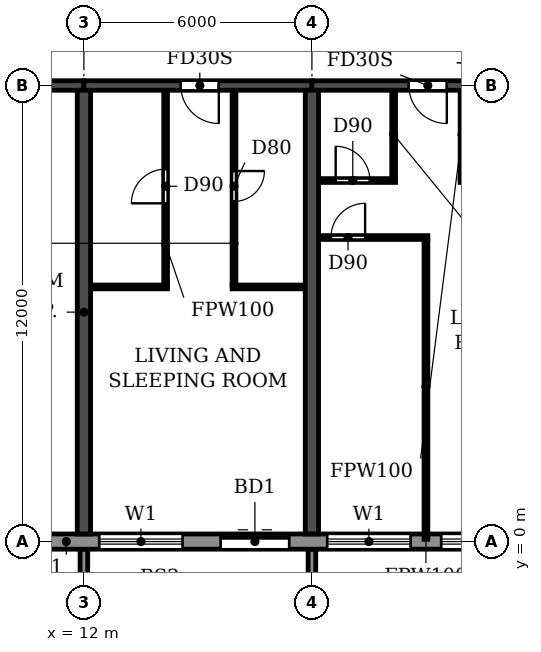
"""IFC4 building model, lengths in metres.
Left out: names, types, materials, properties, quantities, classifications, styles, units other than length and angle.
Written with IfcOpenShell. Run it as: python <this file> out.ifc"""

import sys

from ifc_helpers import new_model, si_unit, direction, frame, frame_2d, origin, place, context, subcontext, project, spatial, polyline, rectangle, outline, extrude, source, transform, mapped, element, fill, save


model = new_model("IFC4")
c1 = context("Model", 3, precision=1e-05, world=origin(), true_north=direction((0.0, 1.0)))
c2 = subcontext(c1, "Body", "Model", "MODEL_VIEW")
j1 = project(units=[si_unit("LENGTHUNIT", "METRE"), si_unit("PLANEANGLEUNIT", "RADIAN")], contexts=[c1])
p1 = place(None, origin())
s1 = spatial("IfcSite", under=j1, at=p1, CompositionType="ELEMENT")
p2 = place(p1, origin())
s2 = spatial("IfcBuilding", under=s1, at=p2, CompositionType="ELEMENT")
p3 = place(p2, frame((0.0, 0.0, 82.8)))
s3 = spatial("IfcBuildingStorey", under=s2, at=p3, CompositionType="ELEMENT", Elevation=82.8)
for number, where, z_axis, x_axis in (
    (1, (12.0, 0.2, 0.0), (0.0, 0.0, 1.0), (0.0, 1.0, 0.0)),
    (2, (18.0, 0.2, 0.0), (0.0, 0.0, 1.0), (0.0, 1.0, 0.0)),
):
    element("IfcWall", number, at=place(p3, frame(where, z_axis=z_axis, x_axis=x_axis)), inside=s3, PredefinedType="SHEAR", context=c2, shape_type="SweptSolid", body=[
        extrude(rectangle(XDim=11.675, YDim=0.35, at=frame_2d((5.837, 0.0))), origin(), (0.0, 0.0, 1.0), 3.06),
    ])
p4 = place(p3, frame((6.2, 12.0, 0.0), z_axis=(0.0, 0.0, 1.0), x_axis=(1.0, 0.0, 0.0)))
e3 = element("IfcWall", 3, at=p4, inside=s3, PredefinedType="SHEAR", context=c2, shape_type="SweptSolid", body=[
    extrude(rectangle(XDim=5.8, YDim=0.25, at=frame_2d((2.9, 0.0))), origin(), (0.0, 0.0, 1.0), 2.46),
])
p5 = place(p4, frame((2.3, 0.0, 0.0)))
e4 = element("IfcOpeningElement", 4, at=p5, cuts=e3, PredefinedType="OPENING", context=c2, shape_type="SweptSolid", body=[
    extrude(rectangle(XDim=1.0, YDim=2.1, at=frame_2d((0.5, 1.05))), frame((0.0, 0.135, 0.0), z_axis=(0.0, -1.0, 0.0), x_axis=(1.0, 0.0, 0.0)), (0.0, 0.0, 1.0), 0.27),
])
p6 = place(p3, frame((12.0, 12.0, 0.0), z_axis=(0.0, 0.0, 1.0), x_axis=(1.0, 0.0, 0.0)))
e5 = element("IfcWall", 5, at=p6, inside=s3, PredefinedType="SHEAR", context=c2, shape_type="SweptSolid", body=[
    extrude(rectangle(XDim=6.0, YDim=0.25, at=frame_2d((3.0, 0.0))), origin(), (0.0, 0.0, 1.0), 2.46),
])
p7 = place(p6, frame((2.55, 0.0, 0.0)))
e6 = element("IfcOpeningElement", 6, at=p7, cuts=e5, PredefinedType="OPENING", context=c2, shape_type="SweptSolid", body=[
    extrude(rectangle(XDim=1.0, YDim=2.1, at=frame_2d((0.5, 1.05))), frame((0.0, 0.135, 0.0), z_axis=(0.0, -1.0, 0.0), x_axis=(1.0, 0.0, 0.0)), (0.0, 0.0, 1.0), 0.27),
])
p8 = place(p3, frame((18.0, 12.0, 0.0), z_axis=(0.0, 0.0, 1.0), x_axis=(1.0, 0.0, 0.0)))
e7 = element("IfcWall", 7, at=p8, inside=s3, PredefinedType="SHEAR", context=c2, shape_type="SweptSolid", body=[
    extrude(rectangle(XDim=6.0, YDim=0.25, at=frame_2d((3.0, 0.0))), origin(), (0.0, 0.0, 1.0), 2.46),
])
p9 = place(p8, frame((2.55, 0.0, 0.0)))
e8 = element("IfcOpeningElement", 8, at=p9, cuts=e7, PredefinedType="OPENING", context=c2, shape_type="SweptSolid", body=[
    extrude(rectangle(XDim=1.0, YDim=2.1, at=frame_2d((0.5, 1.05))), frame((0.0, 0.135, 0.0), z_axis=(0.0, -1.0, 0.0), x_axis=(1.0, 0.0, 0.0)), (0.0, 0.0, 1.0), 0.27),
])
p10 = place(p3, frame((10.683, 0.0, 0.0), z_axis=(0.0, 0.0, 1.0), x_axis=(1.0, 0.0, 0.0)))
e9 = element("IfcWall", 9, at=p10, inside=s3, PredefinedType="STANDARD", context=c2, shape_type="SweptSolid", body=[
    extrude(rectangle(XDim=80.634, YDim=0.4, at=frame_2d((40.317, 0.0))), origin(), (0.0, 0.0, 1.0), 3.06),
])
p11 = place(p10, frame((1.717, 0.0, 0.9)))
e10 = element("IfcOpeningElement", 10, at=p11, cuts=e9, PredefinedType="OPENING", context=c2, shape_type="SweptSolid", body=[
    extrude(rectangle(XDim=2.2, YDim=1.5, at=frame_2d((1.1, 0.75))), frame((0.0, 0.21, 0.0), z_axis=(0.0, -1.0, 0.0), x_axis=(1.0, 0.0, 0.0)), (0.0, 0.0, 1.0), 0.42),
])
p12 = place(p10, frame((4.917, 0.0, 0.0)))
e11 = element("IfcOpeningElement", 11, at=p12, cuts=e9, PredefinedType="OPENING", context=c2, shape_type="SweptSolid", body=[
    extrude(rectangle(XDim=1.8, YDim=2.4, at=frame_2d((0.9, 1.2))), frame((0.0, 0.21, 0.0), z_axis=(0.0, -1.0, 0.0), x_axis=(1.0, 0.0, 0.0)), (0.0, 0.0, 1.0), 0.42),
])
p13 = place(p10, frame((7.717, 0.0, 0.9)))
e12 = element("IfcOpeningElement", 12, at=p13, cuts=e9, PredefinedType="OPENING", context=c2, shape_type="SweptSolid", body=[
    extrude(rectangle(XDim=2.2, YDim=1.5, at=frame_2d((1.1, 0.75))), frame((0.0, 0.21, 0.0), z_axis=(0.0, -1.0, 0.0), x_axis=(1.0, 0.0, 0.0)), (0.0, 0.0, 1.0), 0.42),
])
p14 = place(p10, frame((10.717, 0.0, 0.9)))
e13 = element("IfcOpeningElement", 13, at=p14, cuts=e9, PredefinedType="OPENING", context=c2, shape_type="SweptSolid", body=[
    extrude(rectangle(XDim=2.2, YDim=1.5, at=frame_2d((1.1, 0.75))), frame((0.0, 0.21, 0.0), z_axis=(0.0, -1.0, 0.0), x_axis=(1.0, 0.0, 0.0)), (0.0, 0.0, 1.0), 0.42),
])
p15 = place(p10, frame((13.917, 0.0, 0.0)))
e14 = element("IfcOpeningElement", 14, at=p15, cuts=e9, PredefinedType="OPENING", context=c2, shape_type="SweptSolid", body=[
    extrude(rectangle(XDim=1.8, YDim=2.4, at=frame_2d((0.9, 1.2))), frame((0.0, 0.21, 0.0), z_axis=(0.0, -1.0, 0.0), x_axis=(1.0, 0.0, 0.0)), (0.0, 0.0, 1.0), 0.42),
])
p16 = place(p10, frame((16.717, 0.0, 0.9)))
e15 = element("IfcOpeningElement", 15, at=p16, cuts=e9, PredefinedType="OPENING", context=c2, shape_type="SweptSolid", body=[
    extrude(rectangle(XDim=2.2, YDim=1.5, at=frame_2d((1.1, 0.75))), frame((0.0, 0.21, 0.0), z_axis=(0.0, -1.0, 0.0), x_axis=(1.0, 0.0, 0.0)), (0.0, 0.0, 1.0), 0.42),
])
p17 = place(p10, frame((19.717, 0.0, 0.9)))
e16 = element("IfcOpeningElement", 16, at=p17, cuts=e9, PredefinedType="OPENING", context=c2, shape_type="SweptSolid", body=[
    extrude(rectangle(XDim=2.2, YDim=1.5, at=frame_2d((1.1, 0.75))), frame((0.0, 0.21, 0.0), z_axis=(0.0, -1.0, 0.0), x_axis=(1.0, 0.0, 0.0)), (0.0, 0.0, 1.0), 0.42),
])
p18 = place(p10, frame((22.717, 0.0, 0.9)))
e17 = element("IfcOpeningElement", 17, at=p18, cuts=e9, PredefinedType="OPENING", context=c2, shape_type="SweptSolid", body=[
    extrude(rectangle(XDim=2.2, YDim=1.5, at=frame_2d((1.1, 0.75))), frame((0.0, 0.21, 0.0), z_axis=(0.0, -1.0, 0.0), x_axis=(1.0, 0.0, 0.0)), (0.0, 0.0, 1.0), 0.42),
])
p19 = place(p10, frame((25.917, 0.0, 0.0)))
e18 = element("IfcOpeningElement", 18, at=p19, cuts=e9, PredefinedType="OPENING", context=c2, shape_type="SweptSolid", body=[
    extrude(rectangle(XDim=1.8, YDim=2.4, at=frame_2d((0.9, 1.2))), frame((0.0, 0.21, 0.0), z_axis=(0.0, -1.0, 0.0), x_axis=(1.0, 0.0, 0.0)), (0.0, 0.0, 1.0), 0.42),
])
p20 = place(p10, frame((28.717, 0.0, 0.9)))
e19 = element("IfcOpeningElement", 19, at=p20, cuts=e9, PredefinedType="OPENING", context=c2, shape_type="SweptSolid", body=[
    extrude(rectangle(XDim=2.2, YDim=1.5, at=frame_2d((1.1, 0.75))), frame((0.0, 0.21, 0.0), z_axis=(0.0, -1.0, 0.0), x_axis=(1.0, 0.0, 0.0)), (0.0, 0.0, 1.0), 0.42),
])
p21 = place(p10, frame((31.717, 0.0, 0.9)))
e20 = element("IfcOpeningElement", 20, at=p21, cuts=e9, PredefinedType="OPENING", context=c2, shape_type="SweptSolid", body=[
    extrude(rectangle(XDim=2.2, YDim=1.5, at=frame_2d((1.1, 0.75))), frame((0.0, 0.21, 0.0), z_axis=(0.0, -1.0, 0.0), x_axis=(1.0, 0.0, 0.0)), (0.0, 0.0, 1.0), 0.42),
])
p22 = place(p10, frame((34.717, 0.0, 0.9)))
e21 = element("IfcOpeningElement", 21, at=p22, cuts=e9, PredefinedType="OPENING", context=c2, shape_type="SweptSolid", body=[
    extrude(rectangle(XDim=2.2, YDim=1.5, at=frame_2d((1.1, 0.75))), frame((0.0, 0.21, 0.0), z_axis=(0.0, -1.0, 0.0), x_axis=(1.0, 0.0, 0.0)), (0.0, 0.0, 1.0), 0.42),
])
p23 = place(p10, frame((37.717, 0.0, 0.9)))
e22 = element("IfcOpeningElement", 22, at=p23, cuts=e9, PredefinedType="OPENING", context=c2, shape_type="SweptSolid", body=[
    extrude(rectangle(XDim=2.2, YDim=1.5, at=frame_2d((1.1, 0.75))), frame((0.0, 0.21, 0.0), z_axis=(0.0, -1.0, 0.0), x_axis=(1.0, 0.0, 0.0)), (0.0, 0.0, 1.0), 0.42),
])
p24 = place(p10, frame((40.917, 0.0, 0.0)))
e23 = element("IfcOpeningElement", 23, at=p24, cuts=e9, PredefinedType="OPENING", context=c2, shape_type="SweptSolid", body=[
    extrude(rectangle(XDim=1.8, YDim=2.4, at=frame_2d((0.9, 1.2))), frame((0.0, 0.21, 0.0), z_axis=(0.0, -1.0, 0.0), x_axis=(1.0, 0.0, 0.0)), (0.0, 0.0, 1.0), 0.42),
])
p25 = place(p10, frame((43.717, 0.0, 0.9)))
e24 = element("IfcOpeningElement", 24, at=p25, cuts=e9, PredefinedType="OPENING", context=c2, shape_type="SweptSolid", body=[
    extrude(rectangle(XDim=2.2, YDim=1.5, at=frame_2d((1.1, 0.75))), frame((0.0, 0.21, 0.0), z_axis=(0.0, -1.0, 0.0), x_axis=(1.0, 0.0, 0.0)), (0.0, 0.0, 1.0), 0.42),
])
p26 = place(p10, frame((46.717, 0.0, 0.9)))
e25 = element("IfcOpeningElement", 25, at=p26, cuts=e9, PredefinedType="OPENING", context=c2, shape_type="SweptSolid", body=[
    extrude(rectangle(XDim=2.2, YDim=1.5, at=frame_2d((1.1, 0.75))), frame((0.0, 0.21, 0.0), z_axis=(0.0, -1.0, 0.0), x_axis=(1.0, 0.0, 0.0)), (0.0, 0.0, 1.0), 0.42),
])
p27 = place(p10, frame((49.717, 0.0, 0.9)))
e26 = element("IfcOpeningElement", 26, at=p27, cuts=e9, PredefinedType="OPENING", context=c2, shape_type="SweptSolid", body=[
    extrude(rectangle(XDim=2.2, YDim=1.5, at=frame_2d((1.1, 0.75))), frame((0.0, 0.21, 0.0), z_axis=(0.0, -1.0, 0.0), x_axis=(1.0, 0.0, 0.0)), (0.0, 0.0, 1.0), 0.42),
])
p28 = place(p10, frame((52.917, 0.0, 0.0)))
e27 = element("IfcOpeningElement", 27, at=p28, cuts=e9, PredefinedType="OPENING", context=c2, shape_type="SweptSolid", body=[
    extrude(rectangle(XDim=1.8, YDim=2.4, at=frame_2d((0.9, 1.2))), frame((0.0, 0.21, 0.0), z_axis=(0.0, -1.0, 0.0), x_axis=(1.0, 0.0, 0.0)), (0.0, 0.0, 1.0), 0.42),
])
p29 = place(p10, frame((55.717, 0.0, 0.9)))
e28 = element("IfcOpeningElement", 28, at=p29, cuts=e9, PredefinedType="OPENING", context=c2, shape_type="SweptSolid", body=[
    extrude(rectangle(XDim=2.2, YDim=1.5, at=frame_2d((1.1, 0.75))), frame((0.0, 0.21, 0.0), z_axis=(0.0, -1.0, 0.0), x_axis=(1.0, 0.0, 0.0)), (0.0, 0.0, 1.0), 0.42),
])
p30 = place(p10, frame((58.717, 0.0, 0.9)))
e29 = element("IfcOpeningElement", 29, at=p30, cuts=e9, PredefinedType="OPENING", context=c2, shape_type="SweptSolid", body=[
    extrude(rectangle(XDim=2.2, YDim=1.5, at=frame_2d((1.1, 0.75))), frame((0.0, 0.21, 0.0), z_axis=(0.0, -1.0, 0.0), x_axis=(1.0, 0.0, 0.0)), (0.0, 0.0, 1.0), 0.42),
])
p31 = place(p10, frame((61.717, 0.0, 0.9)))
e30 = element("IfcOpeningElement", 30, at=p31, cuts=e9, PredefinedType="OPENING", context=c2, shape_type="SweptSolid", body=[
    extrude(rectangle(XDim=2.2, YDim=1.5, at=frame_2d((1.1, 0.75))), frame((0.0, 0.21, 0.0), z_axis=(0.0, -1.0, 0.0), x_axis=(1.0, 0.0, 0.0)), (0.0, 0.0, 1.0), 0.42),
])
p32 = place(p10, frame((64.917, 0.0, 0.0)))
e31 = element("IfcOpeningElement", 31, at=p32, cuts=e9, PredefinedType="OPENING", context=c2, shape_type="SweptSolid", body=[
    extrude(rectangle(XDim=1.8, YDim=2.4, at=frame_2d((0.9, 1.2))), frame((0.0, 0.21, 0.0), z_axis=(0.0, -1.0, 0.0), x_axis=(1.0, 0.0, 0.0)), (0.0, 0.0, 1.0), 0.42),
])
p33 = place(p10, frame((67.717, 0.0, 0.9)))
e32 = element("IfcOpeningElement", 32, at=p33, cuts=e9, PredefinedType="OPENING", context=c2, shape_type="SweptSolid", body=[
    extrude(rectangle(XDim=2.2, YDim=1.5, at=frame_2d((1.1, 0.75))), frame((0.0, 0.21, 0.0), z_axis=(0.0, -1.0, 0.0), x_axis=(1.0, 0.0, 0.0)), (0.0, 0.0, 1.0), 0.42),
])
p34 = place(p10, frame((70.717, 0.0, 0.9)))
e33 = element("IfcOpeningElement", 33, at=p34, cuts=e9, PredefinedType="OPENING", context=c2, shape_type="SweptSolid", body=[
    extrude(rectangle(XDim=2.2, YDim=1.5, at=frame_2d((1.1, 0.75))), frame((0.0, 0.21, 0.0), z_axis=(0.0, -1.0, 0.0), x_axis=(1.0, 0.0, 0.0)), (0.0, 0.0, 1.0), 0.42),
])
p35 = place(p10, frame((73.917, 0.0, 0.0)))
e34 = element("IfcOpeningElement", 34, at=p35, cuts=e9, PredefinedType="OPENING", context=c2, shape_type="SweptSolid", body=[
    extrude(rectangle(XDim=1.8, YDim=2.4, at=frame_2d((0.9, 1.2))), frame((0.0, 0.21, 0.0), z_axis=(0.0, -1.0, 0.0), x_axis=(1.0, 0.0, 0.0)), (0.0, 0.0, 1.0), 0.42),
])
p36 = place(p10, frame((76.717, 0.0, 0.9)))
e35 = element("IfcOpeningElement", 35, at=p36, cuts=e9, PredefinedType="OPENING", context=c2, shape_type="SweptSolid", body=[
    extrude(rectangle(XDim=2.2, YDim=1.5, at=frame_2d((1.1, 0.75))), frame((0.0, 0.21, 0.0), z_axis=(0.0, -1.0, 0.0), x_axis=(1.0, 0.0, 0.0)), (0.0, 0.0, 1.0), 0.42),
])
m1 = source(origin(), c2, "Body", "SweptSolid", [
    extrude(outline(polyline([(0.0, 0.0), (0.2, 0.0), (0.2, 1.65), (0.0, 1.65), (0.0, 0.0)])), origin(), (0.0, 0.0, 1.0), 3.1),
])
for number, where in (
    (36, (11.9, -1.85, 0.0)),
    (37, (17.9, -1.85, 0.0)),
):
    element("IfcWall", number, at=place(p3, frame(where)), inside=s3, PredefinedType="STANDARD", context=c2, shape_type="MappedRepresentation", body=[
        mapped(m1, transform((0.0, 0.0, 0.0))),
    ])
p37 = place(p3, frame((12.185, 6.7, 0.0), z_axis=(0.0, 0.0, 1.0), x_axis=(1.0, 0.0, 0.0)))
e38 = element("IfcWall", 38, at=p37, inside=s3, PredefinedType="PARTITIONING", context=c2, shape_type="SweptSolid", body=[
    extrude(rectangle(XDim=2.015, YDim=0.1, at=frame_2d((1.007, 0.0))), origin(), (0.0, 0.0, 1.0), 3.06),
])
p38 = place(p3, frame((15.9, 6.7, 0.0), z_axis=(0.0, 0.0, 1.0), x_axis=(1.0, 0.0, 0.0)))
e39 = element("IfcWall", 39, at=p38, inside=s3, PredefinedType="PARTITIONING", context=c2, shape_type="SweptSolid", body=[
    extrude(rectangle(XDim=1.915, YDim=0.1, at=frame_2d((0.958, 0.0))), origin(), (0.0, 0.0, 1.0), 3.06),
])
p39 = place(p3, frame((18.185, 8.0, 0.0), z_axis=(0.0, 0.0, 1.0), x_axis=(1.0, 0.0, 0.0)))
e40 = element("IfcWall", 40, at=p39, inside=s3, PredefinedType="PARTITIONING", context=c2, shape_type="SweptSolid", body=[
    extrude(rectangle(XDim=2.865, YDim=0.1, at=frame_2d((1.433, 0.0))), origin(), (0.0, 0.0, 1.0), 3.06),
])
p40 = place(p39, frame((0.315, 0.0, 0.0)))
e41 = element("IfcOpeningElement", 41, at=p40, cuts=e40, PredefinedType="OPENING", context=c2, shape_type="SweptSolid", body=[
    extrude(rectangle(XDim=0.9, YDim=2.1, at=frame_2d((0.45, 1.05))), frame((0.0, 0.06, 0.0), z_axis=(0.0, -1.0, 0.0), x_axis=(1.0, 0.0, 0.0)), (0.0, 0.0, 1.0), 0.12),
])
p41 = place(p3, frame((18.185, 9.5, 0.0), z_axis=(0.0, 0.0, 1.0), x_axis=(1.0, 0.0, 0.0)))
e42 = element("IfcWall", 42, at=p41, inside=s3, PredefinedType="PARTITIONING", context=c2, shape_type="SweptSolid", body=[
    extrude(rectangle(XDim=2.015, YDim=0.1, at=frame_2d((1.007, 0.0))), origin(), (0.0, 0.0, 1.0), 3.06),
])
p42 = place(p41, frame((0.44, 0.0, 0.0)))
e43 = element("IfcOpeningElement", 43, at=p42, cuts=e42, PredefinedType="OPENING", context=c2, shape_type="SweptSolid", body=[
    extrude(rectangle(XDim=0.9, YDim=2.1, at=frame_2d((0.45, 1.05))), frame((0.0, 0.06, 0.0), z_axis=(0.0, -1.0, 0.0), x_axis=(1.0, 0.0, 0.0)), (0.0, 0.0, 1.0), 0.12),
])
p43 = place(p3, frame((21.9, 9.5, 0.0), z_axis=(0.0, 0.0, 1.0), x_axis=(1.0, 0.0, 0.0)))
e44 = element("IfcWall", 44, at=p43, inside=s3, PredefinedType="PARTITIONING", context=c2, shape_type="SweptSolid", body=[
    extrude(rectangle(XDim=1.915, YDim=0.1, at=frame_2d((0.958, 0.0))), origin(), (0.0, 0.0, 1.0), 3.06),
])
p44 = place(p43, frame((0.675, 0.0, 0.0)))
e45 = element("IfcOpeningElement", 45, at=p44, cuts=e44, PredefinedType="OPENING", context=c2, shape_type="SweptSolid", body=[
    extrude(rectangle(XDim=0.8, YDim=2.1, at=frame_2d((0.4, 1.05))), frame((0.0, 0.06, 0.0), z_axis=(0.0, -1.0, 0.0), x_axis=(1.0, 0.0, 0.0)), (0.0, 0.0, 1.0), 0.12),
])
p45 = place(p3, frame((14.15, 6.75, 0.0), z_axis=(0.0, 0.0, 1.0), x_axis=(0.0, 1.0, 0.0)))
e46 = element("IfcWall", 46, at=p45, inside=s3, PredefinedType="PARTITIONING", context=c2, shape_type="SweptSolid", body=[
    extrude(rectangle(XDim=5.115, YDim=0.1, at=frame_2d((2.558, 0.0))), origin(), (0.0, 0.0, 1.0), 3.06),
])
p46 = place(p45, frame((2.15, 0.0, 0.0)))
e47 = element("IfcOpeningElement", 47, at=p46, cuts=e46, PredefinedType="OPENING", context=c2, shape_type="SweptSolid", body=[
    extrude(rectangle(XDim=0.9, YDim=2.1, at=frame_2d((0.45, 1.05))), frame((0.0, 0.06, 0.0), z_axis=(0.0, -1.0, 0.0), x_axis=(1.0, 0.0, 0.0)), (0.0, 0.0, 1.0), 0.12),
])
p47 = place(p3, frame((15.95, 6.75, 0.0), z_axis=(0.0, 0.0, 1.0), x_axis=(0.0, 1.0, 0.0)))
e48 = element("IfcWall", 48, at=p47, inside=s3, PredefinedType="PARTITIONING", context=c2, shape_type="SweptSolid", body=[
    extrude(rectangle(XDim=5.115, YDim=0.1, at=frame_2d((2.558, 0.0))), origin(), (0.0, 0.0, 1.0), 3.06),
])
p48 = place(p47, frame((2.2, 0.0, 0.0)))
e49 = element("IfcOpeningElement", 49, at=p48, cuts=e48, PredefinedType="OPENING", context=c2, shape_type="SweptSolid", body=[
    extrude(rectangle(XDim=0.8, YDim=2.1, at=frame_2d((0.4, 1.05))), frame((0.0, 0.06, 0.0), z_axis=(0.0, -1.0, 0.0), x_axis=(1.0, 0.0, 0.0)), (0.0, 0.0, 1.0), 0.12),
])
p49 = place(p3, frame((20.15, 9.55, 0.0), z_axis=(0.0, 0.0, 1.0), x_axis=(0.0, 1.0, 0.0)))
e50 = element("IfcWall", 50, at=p49, inside=s3, PredefinedType="PARTITIONING", context=c2, shape_type="SweptSolid", body=[
    extrude(rectangle(XDim=2.315, YDim=0.1, at=frame_2d((1.157, 0.0))), origin(), (0.0, 0.0, 1.0), 3.06),
])
p50 = place(p3, frame((21.0, 0.06, 0.0), z_axis=(0.0, 0.0, 1.0), x_axis=(0.0, 1.0, 0.0)))
e51 = element("IfcWall", 51, at=p50, inside=s3, PredefinedType="PARTITIONING", context=c2, shape_type="SweptSolid", body=[
    extrude(rectangle(XDim=7.89, YDim=0.1, at=frame_2d((3.945, 0.0))), origin(), (0.0, 0.0, 1.0), 3.06),
])
p51 = place(p3, frame((21.95, 9.55, 0.0), z_axis=(0.0, 0.0, 1.0), x_axis=(0.0, 1.0, 0.0)))
e52 = element("IfcWall", 52, at=p51, inside=s3, PredefinedType="PARTITIONING", context=c2, shape_type="SweptSolid", body=[
    extrude(rectangle(XDim=2.315, YDim=0.1, at=frame_2d((1.157, 0.0))), origin(), (0.0, 0.0, 1.0), 3.06),
])
p52 = place(p11, origin())
e53 = element("IfcWindow", 53, at=p52, inside=s3, PartitioningType="DOUBLE_PANEL_HORIZONTAL", PredefinedType="WINDOW", context=c2, shape_type="SweptSolid", body=[
    extrude(rectangle(XDim=2.2, YDim=1.5, at=frame_2d((1.1, 0.75))), frame((0.0, 0.03, 0.0), z_axis=(0.0, -1.0, 0.0), x_axis=(1.0, 0.0, 0.0)), (0.0, 0.0, 1.0), 0.06),
])
fill(e10, e53)
p53 = place(p12, origin())
e54 = element("IfcDoor", 54, at=p53, inside=s3, OperationType="DOUBLE_DOOR_SLIDING", PredefinedType="DOOR", context=c2, shape_type="SweptSolid", body=[
    extrude(rectangle(XDim=1.8, YDim=2.4, at=frame_2d((0.9, 1.2))), frame((0.0, 0.025, 0.0), z_axis=(0.0, -1.0, 0.0), x_axis=(1.0, 0.0, 0.0)), (0.0, 0.0, 1.0), 0.05),
])
fill(e11, e54)
p54 = place(p13, origin())
e55 = element("IfcWindow", 55, at=p54, inside=s3, PartitioningType="DOUBLE_PANEL_HORIZONTAL", PredefinedType="WINDOW", context=c2, shape_type="SweptSolid", body=[
    extrude(rectangle(XDim=2.2, YDim=1.5, at=frame_2d((1.1, 0.75))), frame((0.0, 0.03, 0.0), z_axis=(0.0, -1.0, 0.0), x_axis=(1.0, 0.0, 0.0)), (0.0, 0.0, 1.0), 0.06),
])
fill(e12, e55)
p55 = place(p14, origin())
e56 = element("IfcWindow", 56, at=p55, inside=s3, PartitioningType="DOUBLE_PANEL_HORIZONTAL", PredefinedType="WINDOW", context=c2, shape_type="SweptSolid", body=[
    extrude(rectangle(XDim=2.2, YDim=1.5, at=frame_2d((1.1, 0.75))), frame((0.0, 0.03, 0.0), z_axis=(0.0, -1.0, 0.0), x_axis=(1.0, 0.0, 0.0)), (0.0, 0.0, 1.0), 0.06),
])
fill(e13, e56)
p56 = place(p46, origin())
e57 = element("IfcDoor", 57, at=p56, inside=s3, OperationType="SINGLE_SWING_LEFT", PredefinedType="DOOR", context=c2, shape_type="SweptSolid", body=[
    extrude(rectangle(XDim=0.9, YDim=2.1, at=frame_2d((0.45, 1.05))), frame((0.0, 0.025, 0.0), z_axis=(0.0, -1.0, 0.0), x_axis=(1.0, 0.0, 0.0)), (0.0, 0.0, 1.0), 0.05),
])
fill(e47, e57)
p57 = place(p7, frame((1.0, 0.0, 0.0), z_axis=(0.0, 0.0, 1.0), x_axis=(-1.0, 0.0, 0.0)))
e58 = element("IfcDoor", 58, at=p57, inside=s3, OperationType="SINGLE_SWING_LEFT", PredefinedType="DOOR", context=c2, shape_type="SweptSolid", body=[
    extrude(rectangle(XDim=1.0, YDim=2.1, at=frame_2d((0.5, 1.05))), frame((0.0, 0.025, 0.0), z_axis=(0.0, -1.0, 0.0), x_axis=(1.0, 0.0, 0.0)), (0.0, 0.0, 1.0), 0.05),
])
fill(e6, e58)
p58 = place(p48, frame((0.8, 0.0, 0.0), z_axis=(0.0, 0.0, 1.0), x_axis=(-1.0, 0.0, 0.0)))
e59 = element("IfcDoor", 59, at=p58, inside=s3, OperationType="SINGLE_SWING_LEFT", PredefinedType="DOOR", context=c2, shape_type="SweptSolid", body=[
    extrude(rectangle(XDim=0.8, YDim=2.1, at=frame_2d((0.4, 1.05))), frame((0.0, 0.025, 0.0), z_axis=(0.0, -1.0, 0.0), x_axis=(1.0, 0.0, 0.0)), (0.0, 0.0, 1.0), 0.05),
])
fill(e49, e59)
p59 = place(p40, origin())
e60 = element("IfcDoor", 60, at=p59, inside=s3, OperationType="SINGLE_SWING_RIGHT", PredefinedType="DOOR", context=c2, shape_type="SweptSolid", body=[
    extrude(rectangle(XDim=0.9, YDim=2.1, at=frame_2d((0.45, 1.05))), frame((0.0, 0.025, 0.0), z_axis=(0.0, -1.0, 0.0), x_axis=(1.0, 0.0, 0.0)), (0.0, 0.0, 1.0), 0.05),
])
fill(e41, e60)
p60 = place(p42, origin())
e61 = element("IfcDoor", 61, at=p60, inside=s3, OperationType="SINGLE_SWING_LEFT", PredefinedType="DOOR", context=c2, shape_type="SweptSolid", body=[
    extrude(rectangle(XDim=0.9, YDim=2.1, at=frame_2d((0.45, 1.05))), frame((0.0, 0.025, 0.0), z_axis=(0.0, -1.0, 0.0), x_axis=(1.0, 0.0, 0.0)), (0.0, 0.0, 1.0), 0.05),
])
fill(e43, e61)
p61 = place(p9, frame((1.0, 0.0, 0.0), z_axis=(0.0, 0.0, 1.0), x_axis=(-1.0, 0.0, 0.0)))
e62 = element("IfcDoor", 62, at=p61, inside=s3, OperationType="SINGLE_SWING_LEFT", PredefinedType="DOOR", context=c2, shape_type="SweptSolid", body=[
    extrude(rectangle(XDim=1.0, YDim=2.1, at=frame_2d((0.5, 1.05))), frame((0.0, 0.025, 0.0), z_axis=(0.0, -1.0, 0.0), x_axis=(1.0, 0.0, 0.0)), (0.0, 0.0, 1.0), 0.05),
])
fill(e8, e62)
save(model, sys.argv[1])
